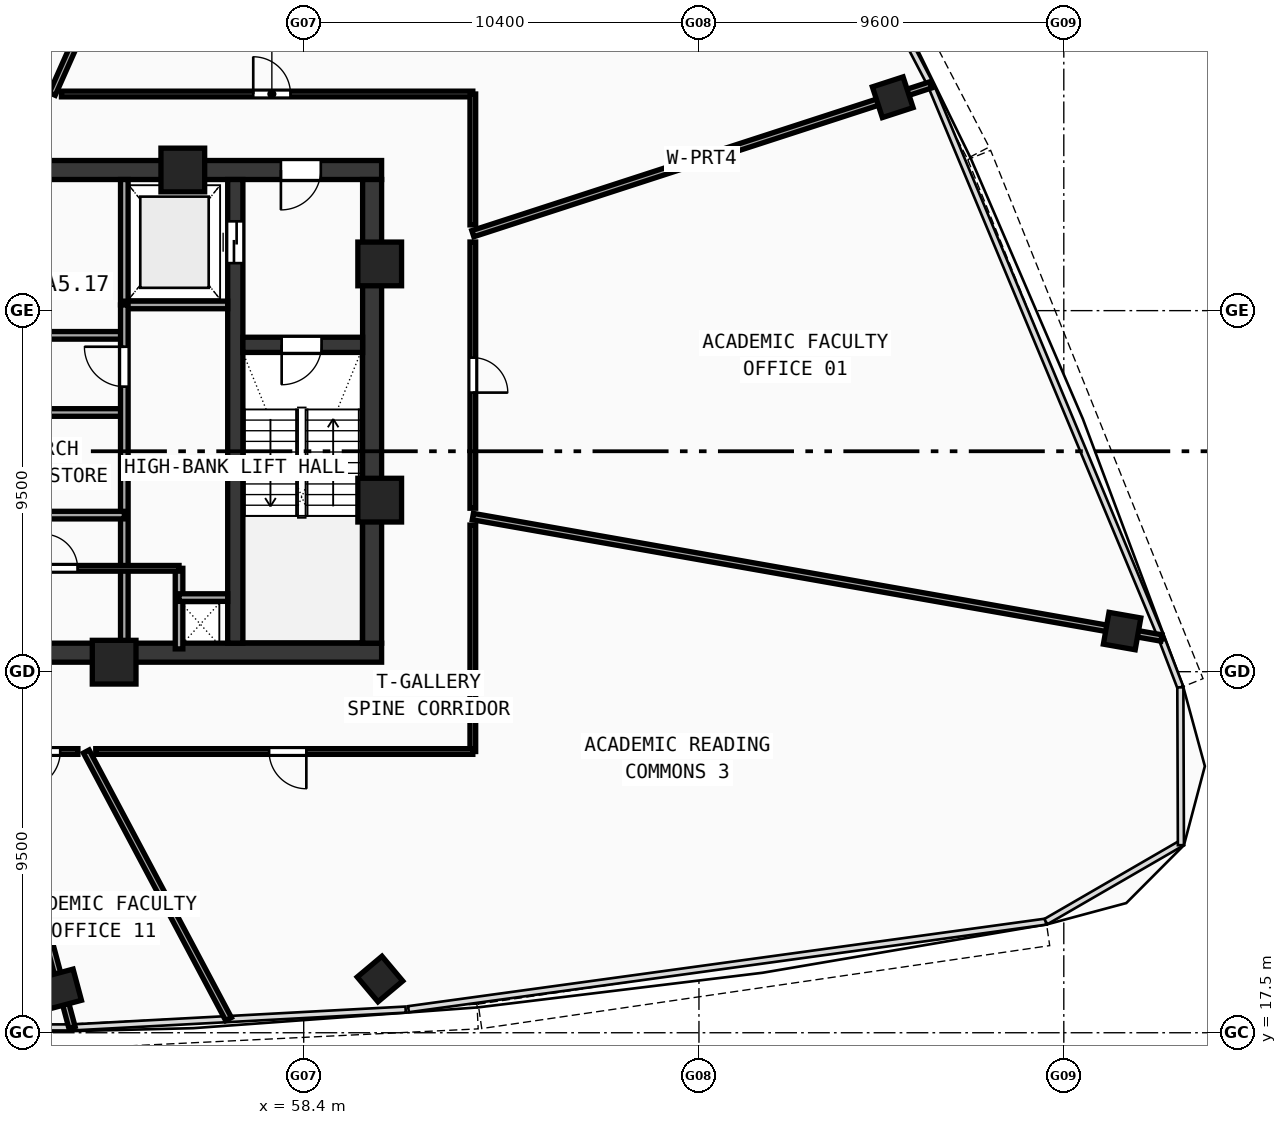
"""IFC4 building model, lengths in metres.
Left out: names, types, materials, properties, quantities, classifications, styles, units other than length and angle.
Written with IfcOpenShell. Run it as: python <this file> out.ifc"""

import sys

from ifc_helpers import new_model, si_unit, direction, frame, frame_2d, origin, origin_with_axes, origin_2d, place, context, subcontext, project, spatial, rectangle, hollow_rectangle, extrude, source, transform, mapped, element, fill, save


model = new_model("IFC4")
c1 = context("Model", 3, precision=1e-05, world=origin(), true_north=direction((0.0, 1.0)))
c2 = subcontext(c1, "Body", "Model", "MODEL_VIEW")
j1 = project(units=[si_unit("LENGTHUNIT", "METRE"), si_unit("PLANEANGLEUNIT", "RADIAN")], contexts=[c1])
p1 = place(None, origin())
s1 = spatial("IfcSite", under=j1, at=p1, CompositionType="ELEMENT")
p2 = place(p1, origin())
s2 = spatial("IfcBuilding", under=s1, at=p2, CompositionType="ELEMENT")
p3 = place(p2, frame((0.0, 0.0, 263.18)))
s3 = spatial("IfcBuildingStorey", under=s2, at=p3, CompositionType="ELEMENT", Elevation=263.18)
p4 = place(p3, frame((35.55, 27.5, 0.0), z_axis=(0.0, 0.0, 1.0), x_axis=(1.0, 0.0, 0.0)))
e1 = element("IfcWall", 1, at=p4, inside=s3, PredefinedType="SHEAR", context=c2, shape_type="SweptSolid", body=[
    extrude(rectangle(XDim=24.9, YDim=0.5, at=frame_2d((12.45, 0.0))), origin(), (0.0, 0.0, 1.0), 3.47),
])
p5 = place(p3, frame((49.2, 40.2, 0.0), z_axis=(0.0, 0.0, 1.0), x_axis=(1.0, 0.0, 0.0)))
e2 = element("IfcWall", 2, at=p5, inside=s3, PredefinedType="SHEAR", context=c2, shape_type="SweptSolid", body=[
    extrude(rectangle(XDim=11.25, YDim=0.5, at=frame_2d((5.625, 0.0))), origin(), (0.0, 0.0, 1.0), 3.47),
])
p6 = place(p5, frame((8.6, 0.0, 0.0)))
e3 = element("IfcOpeningElement", 3, at=p6, cuts=e2, PredefinedType="OPENING", context=c2, shape_type="SweptSolid", body=[
    extrude(rectangle(XDim=1.05, YDim=2.1, at=frame_2d((0.525, 1.05))), frame((0.0, 0.26, 0.0), z_axis=(0.0, -1.0, 0.0), x_axis=(1.0, 0.0, 0.0)), (0.0, 0.0, 1.0), 0.52),
])
p7 = place(p3, frame((60.2, 27.75, 0.0), z_axis=(0.0, 0.0, 1.0), x_axis=(0.0, 1.0, 0.0)))
e4 = element("IfcWall", 4, at=p7, inside=s3, PredefinedType="SHEAR", context=c2, shape_type="SweptSolid", body=[
    extrude(rectangle(XDim=12.2, YDim=0.5, at=frame_2d((6.1, 0.0))), origin(), (0.0, 0.0, 1.0), 3.47),
])
p8 = place(p3, frame((56.6, 27.75, 0.0), z_axis=(0.0, 0.0, 1.0), x_axis=(0.0, 1.0, 0.0)))
e5 = element("IfcWall", 5, at=p8, inside=s3, PredefinedType="SHEAR", context=c2, shape_type="SweptSolid", body=[
    extrude(rectangle(XDim=12.2, YDim=0.4, at=frame_2d((6.1, 0.0))), origin(), (0.0, 0.0, 1.0), 3.47),
])
p9 = place(p8, frame((10.0, 0.0, 0.0)))
e6 = element("IfcOpeningElement", 6, at=p9, cuts=e5, PredefinedType="OPENING", context=c2, shape_type="SweptSolid", body=[
    extrude(rectangle(XDim=1.1, YDim=2.1, at=frame_2d((0.55, 1.05))), frame((0.0, 0.21, 0.0), z_axis=(0.0, -1.0, 0.0), x_axis=(1.0, 0.0, 0.0)), (0.0, 0.0, 1.0), 0.42),
])
p10 = place(p3, frame((56.8, 35.6, 0.0), z_axis=(0.0, 0.0, 1.0), x_axis=(1.0, 0.0, 0.0)))
e7 = element("IfcWall", 7, at=p10, inside=s3, PredefinedType="SHEAR", context=c2, shape_type="SweptSolid", body=[
    extrude(rectangle(XDim=3.15, YDim=0.4, at=frame_2d((1.575, 0.0))), origin(), (0.0, 0.0, 1.0), 3.47),
])
p11 = place(p10, frame((1.02, 0.0, 0.0)))
e8 = element("IfcOpeningElement", 8, at=p11, cuts=e7, PredefinedType="OPENING", context=c2, shape_type="SweptSolid", body=[
    extrude(rectangle(XDim=1.05, YDim=2.1, at=frame_2d((0.525, 1.05))), frame((0.0, 0.21, 0.0), z_axis=(0.0, -1.0, 0.0), x_axis=(1.0, 0.0, 0.0)), (0.0, 0.0, 1.0), 0.42),
])
m1 = source(origin(), c2, "Body", "SweptSolid", [
    extrude(hollow_rectangle(XDim=1.15, YDim=1.15, WallThickness=0.048, at=origin_2d()), origin(), (0.0, 0.0, 1.0), 3.73),
])
for number, where, z_axis, x_axis in (
    (9, (53.412, 27.25, -0.26), (0.0, 0.0, 1.0), (1.0, 0.0, 0.0)),
    (10, (60.4, 31.513, -0.26), (0.0, 0.0, 1.0), (1.0, 0.0, 0.0)),
    (11, (60.4, 37.729, -0.26), (0.0, 0.0, 1.0), (1.0, 0.0, 0.0)),
    (12, (55.219, 40.2, -0.26), (0.0, 0.0, 1.0), (1.0, 0.0, 0.0)),
):
    element("IfcColumn", number, at=place(p3, frame(where, z_axis=z_axis, x_axis=x_axis)), inside=s3, PredefinedType="COLUMN", context=c2, shape_type="MappedRepresentation", body=[
        mapped(m1, transform((0.0, 0.0, 0.0), scale=1.0)),
    ])
m2 = source(origin(), c2, "Body", "SweptSolid", [
    extrude(hollow_rectangle(XDim=0.85, YDim=0.85, WallThickness=0.034, at=origin_2d()), origin(), (0.0, 0.0, 1.0), 3.73),
])
for number, where, z_axis, x_axis in (
    (13, (52.031, 18.654, -0.26), (0.0, 0.0, 1.0), (0.966, 0.259, 0.0)),
    (14, (60.407, 18.914, -0.26), (0.0, 0.0, 1.0), (0.766, 0.643, 0.0)),
    (15, (79.934, 28.069, -0.26), (0.0, 0.0, 1.0), (0.174, 0.985, 0.0)),
    (16, (73.899, 42.115, -0.26), (0.0, 0.0, 1.0), (-0.309, 0.951, 0.0)),
):
    element("IfcColumn", number, at=place(p3, frame(where, z_axis=z_axis, x_axis=x_axis)), inside=s3, PredefinedType="COLUMN", context=c2, shape_type="MappedRepresentation", body=[
        mapped(m2, transform((0.0, 0.0, 0.0), scale=1.0)),
    ])
p12 = place(p3, frame((53.68, 36.65, 0.0), z_axis=(0.0, 0.0, 1.0), x_axis=(0.0, 1.0, 0.0)))
e17 = element("IfcWall", 17, at=p12, inside=s3, PredefinedType="SOLIDWALL", context=c2, shape_type="SweptSolid", body=[
    extrude(rectangle(XDim=3.3, YDim=0.2, at=frame_2d((1.65, 0.0))), origin(), (0.0, 0.0, 1.0), 3.47),
])
p13 = place(p3, frame((53.68, 36.65, 0.0), z_axis=(0.0, 0.0, 1.0), x_axis=(1.0, 0.0, 0.0)))
e18 = element("IfcWall", 18, at=p13, inside=s3, PredefinedType="SOLIDWALL", context=c2, shape_type="SweptSolid", body=[
    extrude(rectangle(XDim=2.72, YDim=0.2, at=frame_2d((1.36, 0.0))), origin(), (0.0, 0.0, 1.0), 3.47),
])
p14 = place(p3, frame((48.95, 35.85, 0.0), z_axis=(0.0, 0.0, 1.0), x_axis=(1.0, 0.0, 0.0)))
e19 = element("IfcWall", 19, at=p14, inside=s3, PredefinedType="SOLIDWALL", context=c2, shape_type="SweptSolid", body=[
    extrude(rectangle(XDim=4.73, YDim=0.2, at=frame_2d((2.365, 0.0))), origin(), (0.0, 0.0, 1.0), 3.47),
])
p15 = place(p14, frame((1.8, 0.0, 0.0)))
e20 = element("IfcOpeningElement", 20, at=p15, cuts=e19, PredefinedType="OPENING", context=c2, shape_type="SweptSolid", body=[
    extrude(rectangle(XDim=0.9, YDim=2.1, at=frame_2d((0.45, 1.05))), frame((0.0, 0.11, 0.0), z_axis=(0.0, -1.0, 0.0), x_axis=(1.0, 0.0, 0.0)), (0.0, 0.0, 1.0), 0.22),
])
p16 = place(p3, frame((43.85, 33.82, 0.0), z_axis=(0.0, 0.0, 1.0), x_axis=(1.0, 0.0, 0.0)))
e21 = element("IfcWall", 21, at=p16, inside=s3, PredefinedType="SOLIDWALL", context=c2, shape_type="SweptSolid", body=[
    extrude(rectangle(XDim=9.83, YDim=0.2, at=frame_2d((4.915, 0.0))), origin(), (0.0, 0.0, 1.0), 3.47),
])
p17 = place(p16, frame((1.2, 0.0, 0.0)))
e22 = element("IfcOpeningElement", 22, at=p17, cuts=e21, PredefinedType="OPENING", context=c2, shape_type="SweptSolid", body=[
    extrude(rectangle(XDim=0.9, YDim=2.1, at=frame_2d((0.45, 1.05))), frame((0.0, 0.11, 0.0), z_axis=(0.0, -1.0, 0.0), x_axis=(1.0, 0.0, 0.0)), (0.0, 0.0, 1.0), 0.22),
])
p18 = place(p16, frame((4.6, 0.0, 0.0)))
e23 = element("IfcOpeningElement", 23, at=p18, cuts=e21, PredefinedType="OPENING", context=c2, shape_type="SweptSolid", body=[
    extrude(rectangle(XDim=0.9, YDim=2.1, at=frame_2d((0.45, 1.05))), frame((0.0, 0.11, 0.0), z_axis=(0.0, -1.0, 0.0), x_axis=(1.0, 0.0, 0.0)), (0.0, 0.0, 1.0), 0.22),
])
p19 = place(p3, frame((53.68, 27.6, 0.0), z_axis=(0.0, 0.0, 1.0), x_axis=(0.0, 1.0, 0.0)))
e24 = element("IfcWall", 24, at=p19, inside=s3, PredefinedType="SOLIDWALL", context=c2, shape_type="SweptSolid", body=[
    extrude(rectangle(XDim=9.05, YDim=0.2, at=frame_2d((4.525, 0.0))), origin(), (0.0, 0.0, 1.0), 3.47),
])
p20 = place(p19, frame((6.9, 0.0, 0.0)))
e25 = element("IfcOpeningElement", 25, at=p20, cuts=e24, PredefinedType="OPENING", context=c2, shape_type="SweptSolid", body=[
    extrude(rectangle(XDim=1.05, YDim=2.1, at=frame_2d((0.525, 1.05))), frame((0.0, 0.11, 0.0), z_axis=(0.0, -1.0, 0.0), x_axis=(1.0, 0.0, 0.0)), (0.0, 0.0, 1.0), 0.22),
])
p21 = place(p3, frame((43.85, 31.12, 0.0), z_axis=(0.0, 0.0, 1.0), x_axis=(1.0, 0.0, 0.0)))
e26 = element("IfcWall", 26, at=p21, inside=s3, PredefinedType="SOLIDWALL", context=c2, shape_type="SweptSolid", body=[
    extrude(rectangle(XDim=9.83, YDim=0.2, at=frame_2d((4.915, 0.0))), origin(), (0.0, 0.0, 1.0), 3.47),
])
p22 = place(p3, frame((55.12, 27.6, 0.0), z_axis=(0.0, 0.0, 1.0), x_axis=(0.0, 1.0, 0.0)))
e27 = element("IfcWall", 27, at=p22, inside=s3, PredefinedType="SOLIDWALL", context=c2, shape_type="SweptSolid", body=[
    extrude(rectangle(XDim=2.12, YDim=0.2, at=frame_2d((1.06, 0.0))), origin(), (0.0, 0.0, 1.0), 3.47),
])
p23 = place(p3, frame((55.12, 28.95, 0.0), z_axis=(0.0, 0.0, 1.0), x_axis=(1.0, 0.0, 0.0)))
e28 = element("IfcWall", 28, at=p23, inside=s3, PredefinedType="SOLIDWALL", context=c2, shape_type="SweptSolid", body=[
    extrude(rectangle(XDim=1.28, YDim=0.2, at=frame_2d((0.64, 0.0))), origin(), (0.0, 0.0, 1.0), 3.47),
])
p24 = place(p3, frame((51.05, 29.72, 0.0), z_axis=(0.0, 0.0, 1.0), x_axis=(1.0, 0.0, 0.0)))
e29 = element("IfcWall", 29, at=p24, inside=s3, PredefinedType="PARTITIONING", context=c2, shape_type="SweptSolid", body=[
    extrude(rectangle(XDim=4.07, YDim=0.15, at=frame_2d((2.035, 0.0))), origin(), (0.0, 0.0, 1.0), 3.47),
])
p25 = place(p24, frame((0.5, 0.0, 0.0)))
e30 = element("IfcOpeningElement", 30, at=p25, cuts=e29, PredefinedType="OPENING", context=c2, shape_type="SweptSolid", body=[
    extrude(rectangle(XDim=0.9, YDim=2.1, at=frame_2d((0.45, 1.05))), frame((0.0, 0.085, 0.0), z_axis=(0.0, -1.0, 0.0), x_axis=(1.0, 0.0, 0.0)), (0.0, 0.0, 1.0), 0.17),
])
p26 = place(p3, frame((62.85, 38.525, 0.0), z_axis=(0.0, 0.0, 1.0), x_axis=(0.951057436246, 0.309014163043, 0.0)))
e31 = element("IfcWall", 31, at=p26, inside=s3, PredefinedType="PARTITIONING", context=c2, shape_type="SweptSolid", body=[
    extrude(rectangle(XDim=12.667, YDim=0.17, at=frame_2d((6.333, 0.0))), origin(), (0.0, 0.0, 1.0), 2.82),
])
p27 = place(p3, frame((51.784, 42.2, 0.0), z_axis=(0.0, 0.0, 1.0), x_axis=(0.406737985753, 0.913544859843, 0.0)))
e32 = element("IfcWall", 32, at=p27, inside=s3, PredefinedType="PARTITIONING", context=c2, shape_type="SweptSolid", body=[
    extrude(rectangle(XDim=24.707, YDim=0.17, at=frame_2d((12.354, 0.0))), origin(), (0.0, 0.0, 1.0), 2.82),
])
p28 = place(p3, frame((50.358, 24.9, 0.0), z_axis=(0.0, 0.0, 1.0), x_axis=(0.258810769147, -0.965928043787, 0.0)))
e33 = element("IfcWall", 33, at=p28, inside=s3, PredefinedType="PARTITIONING", context=c2, shape_type="SweptSolid", body=[
    extrude(rectangle(XDim=7.516, YDim=0.17, at=frame_2d((3.758, 0.0))), origin(), (0.0, 0.0, 1.0), 2.82),
])
p29 = place(p3, frame((52.679, 24.9, 0.0), z_axis=(0.0, 0.0, 1.0), x_axis=(0.469475347358, -0.882945580556, 0.0)))
e34 = element("IfcWall", 34, at=p29, inside=s3, PredefinedType="PARTITIONING", context=c2, shape_type="SweptSolid", body=[
    extrude(rectangle(XDim=7.973, YDim=0.17, at=frame_2d((3.987, 0.0))), origin(), (0.0, 0.0, 1.0), 2.82),
])
p30 = place(p3, frame((62.85, 31.082, 0.0), z_axis=(0.0, 0.0, 1.0), x_axis=(0.984806394916, -0.173655879639, 0.0)))
e35 = element("IfcWall", 35, at=p30, inside=s3, PredefinedType="PARTITIONING", context=c2, shape_type="SweptSolid", body=[
    extrude(rectangle(XDim=18.397, YDim=0.17, at=frame_2d((9.199, 0.0))), origin(), (0.0, 0.0, 1.0), 2.82),
])
p31 = place(p3, frame((52.025, 42.2, 0.0), z_axis=(0.0, 0.0, 1.0), x_axis=(1.0, 0.0, 0.0)))
e36 = element("IfcWall", 36, at=p31, inside=s3, PredefinedType="PARTITIONING", context=c2, shape_type="SweptSolid", body=[
    extrude(rectangle(XDim=10.825, YDim=0.15, at=frame_2d((5.413, 0.0))), origin(), (0.0, 0.0, 1.0), 2.82),
])
p32 = place(p31, frame((5.047, 0.0, 0.0)))
e37 = element("IfcOpeningElement", 37, at=p32, cuts=e36, PredefinedType="OPENING", context=c2, shape_type="SweptSolid", body=[
    extrude(rectangle(XDim=0.98, YDim=2.12, at=frame_2d((0.49, 1.06))), frame((0.0, 0.085, 0.0), z_axis=(0.0, -1.0, 0.0), x_axis=(1.0, 0.0, 0.0)), (0.0, 0.0, 1.0), 0.17),
])
p33 = place(p3, frame((62.85, 42.2, 0.0), z_axis=(0.0, 0.0, 1.0), x_axis=(0.0, -1.0, 0.0)))
e38 = element("IfcWall", 38, at=p33, inside=s3, PredefinedType="PARTITIONING", context=c2, shape_type="SweptSolid", body=[
    extrude(rectangle(XDim=3.444, YDim=0.15, at=frame_2d((1.722, 0.0))), origin(), (0.0, 0.0, 1.0), 3.12),
])
p34 = place(p3, frame((62.85, 38.305, 0.0), z_axis=(0.0, 0.0, 1.0), x_axis=(0.0, -1.0, 0.0)))
e39 = element("IfcWall", 39, at=p34, inside=s3, PredefinedType="PARTITIONING", context=c2, shape_type="SweptSolid", body=[
    extrude(rectangle(XDim=7.004, YDim=0.15, at=frame_2d((3.502, 0.0))), origin(), (0.0, 0.0, 1.0), 3.47),
])
p35 = place(p34, frame((3.042, 0.0, 0.0)))
e40 = element("IfcOpeningElement", 40, at=p35, cuts=e39, PredefinedType="OPENING", context=c2, shape_type="SweptSolid", body=[
    extrude(rectangle(XDim=0.92, YDim=2.1, at=frame_2d((0.46, 1.05))), frame((0.0, 0.085, 0.0), z_axis=(0.0, -1.0, 0.0), x_axis=(1.0, 0.0, 0.0)), (0.0, 0.0, 1.0), 0.17),
])
p36 = place(p3, frame((62.85, 30.858, 0.0), z_axis=(0.0, 0.0, 1.0), x_axis=(0.0, -1.0, 0.0)))
e41 = element("IfcWall", 41, at=p36, inside=s3, PredefinedType="PARTITIONING", context=c2, shape_type="SweptSolid", body=[
    extrude(rectangle(XDim=5.958, YDim=0.15, at=frame_2d((2.979, 0.0))), origin(), (0.0, 0.0, 1.0), 3.12),
])
p37 = place(p3, frame((62.85, 24.9, 0.0), z_axis=(0.0, 0.0, 1.0), x_axis=(-1.0, 0.0, 0.0)))
e42 = element("IfcWall", 42, at=p37, inside=s3, PredefinedType="PARTITIONING", context=c2, shape_type="SweptSolid", body=[
    extrude(rectangle(XDim=9.922, YDim=0.15, at=frame_2d((4.961, 0.0))), origin(), (0.0, 0.0, 1.0), 2.82),
])
p38 = place(p37, frame((4.381, 0.0, 0.0)))
e43 = element("IfcOpeningElement", 43, at=p38, cuts=e42, PredefinedType="OPENING", context=c2, shape_type="SweptSolid", body=[
    extrude(rectangle(XDim=0.98, YDim=2.12, at=frame_2d((0.49, 1.06))), frame((0.0, 0.085, 0.0), z_axis=(0.0, -1.0, 0.0), x_axis=(1.0, 0.0, 0.0)), (0.0, 0.0, 1.0), 0.17),
])
p39 = place(p3, frame((52.459, 24.9, 0.0), z_axis=(0.0, 0.0, 1.0), x_axis=(-1.0, 0.0, 0.0)))
e44 = element("IfcWall", 44, at=p39, inside=s3, PredefinedType="PARTITIONING", context=c2, shape_type="SweptSolid", body=[
    extrude(rectangle(XDim=1.873, YDim=0.15, at=frame_2d((0.937, 0.0))), origin(), (0.0, 0.0, 1.0), 3.47),
])
p40 = place(p39, frame((0.466, 0.0, 0.0)))
e45 = element("IfcOpeningElement", 45, at=p40, cuts=e44, PredefinedType="OPENING", context=c2, shape_type="SweptSolid", body=[
    extrude(rectangle(XDim=0.98, YDim=2.12, at=frame_2d((0.49, 1.06))), frame((0.0, 0.085, 0.0), z_axis=(0.0, -1.0, 0.0), x_axis=(1.0, 0.0, 0.0)), (0.0, 0.0, 1.0), 0.17),
])
m3 = source(origin(), c2, "Body", "SweptSolid", [
    extrude(rectangle(XDim=1.05, YDim=2.1, at=frame_2d((0.525, 1.05))), frame((0.0, 0.025, 0.0), z_axis=(0.0, -1.0, 0.0), x_axis=(1.0, 0.0, 0.0)), (0.0, 0.0, 1.0), 0.05),
])
p41 = place(p11, frame((1.05, 0.0, 0.0), z_axis=(0.0, 0.0, 1.0), x_axis=(-1.0, 0.0, 0.0)))
e46 = element("IfcDoor", 46, at=p41, inside=s3, OperationType="SINGLE_SWING_RIGHT", PredefinedType="DOOR", context=c2, shape_type="MappedRepresentation", body=[
    mapped(m3, transform((0.0, 0.0, 0.0), scale=1.0)),
])
fill(e8, e46)
p42 = place(p6, frame((1.05, 0.0, 0.0), z_axis=(0.0, 0.0, 1.0), x_axis=(-1.0, 0.0, 0.0)))
e47 = element("IfcDoor", 47, at=p42, inside=s3, OperationType="SINGLE_SWING_RIGHT", PredefinedType="DOOR", context=c2, shape_type="MappedRepresentation", body=[
    mapped(m3, transform((0.0, 0.0, 0.0), scale=1.0)),
])
fill(e3, e47)
m4 = source(origin(), c2, "Body", "SweptSolid", [
    extrude(rectangle(XDim=1.1, YDim=2.1, at=frame_2d((0.55, 1.05))), frame((0.0, 0.025, 0.0), z_axis=(0.0, -1.0, 0.0), x_axis=(1.0, 0.0, 0.0)), (0.0, 0.0, 1.0), 0.05),
])
p43 = place(p9, origin_with_axes())
e48 = element("IfcDoor", 48, at=p43, inside=s3, OperationType="DOUBLE_DOOR_SLIDING", PredefinedType="DOOR", context=c2, shape_type="MappedRepresentation", body=[
    mapped(m4, transform((0.0, 0.0, 0.0), scale=1.0)),
])
fill(e6, e48)
p44 = place(p20, origin_with_axes())
e49 = element("IfcDoor", 49, at=p44, inside=s3, OperationType="SINGLE_SWING_RIGHT", PredefinedType="DOOR", context=c2, shape_type="MappedRepresentation", body=[
    mapped(m3, transform((0.0, 0.0, 0.0), scale=1.0)),
])
fill(e25, e49)
m5 = source(origin(), c2, "Body", "SweptSolid", [
    extrude(rectangle(XDim=0.9, YDim=2.1, at=frame_2d((0.45, 1.05))), frame((0.0, 0.025, 0.0), z_axis=(0.0, -1.0, 0.0), x_axis=(1.0, 0.0, 0.0)), (0.0, 0.0, 1.0), 0.05),
])
p45 = place(p25, origin_with_axes())
e50 = element("IfcDoor", 50, at=p45, inside=s3, OperationType="SINGLE_SWING_LEFT", PredefinedType="DOOR", context=c2, shape_type="MappedRepresentation", body=[
    mapped(m5, transform((0.0, 0.0, 0.0), scale=1.0)),
])
fill(e30, e50)
m6 = source(origin(), c2, "Body", "SweptSolid", [
    extrude(rectangle(XDim=0.92, YDim=2.1, at=frame_2d((0.46, 1.05))), frame((0.0, 0.025, 0.0), z_axis=(0.0, -1.0, 0.0), x_axis=(1.0, 0.0, 0.0)), (0.0, 0.0, 1.0), 0.05),
])
p46 = place(p35, origin_with_axes())
e51 = element("IfcDoor", 51, at=p46, inside=s3, OperationType="SINGLE_SWING_RIGHT", PredefinedType="DOOR", context=c2, shape_type="MappedRepresentation", body=[
    mapped(m6, transform((0.0, 0.0, 0.0), scale=1.0)),
])
fill(e40, e51)
m7 = source(origin(), c2, "Body", "SweptSolid", [
    extrude(rectangle(XDim=0.98, YDim=2.12, at=frame_2d((0.49, 1.06))), frame((0.0, 0.025, 0.0), z_axis=(0.0, -1.0, 0.0), x_axis=(1.0, 0.0, 0.0)), (0.0, 0.0, 1.0), 0.05),
])
p47 = place(p32, origin_with_axes())
e52 = element("IfcDoor", 52, at=p47, inside=s3, OperationType="SINGLE_SWING_LEFT", PredefinedType="DOOR", context=c2, shape_type="MappedRepresentation", body=[
    mapped(m7, transform((0.0, 0.0, 0.0), scale=1.0)),
])
fill(e37, e52)
p48 = place(p40, origin_with_axes())
e53 = element("IfcDoor", 53, at=p48, inside=s3, OperationType="SINGLE_SWING_RIGHT", PredefinedType="DOOR", context=c2, shape_type="MappedRepresentation", body=[
    mapped(m7, transform((0.0, 0.0, 0.0), scale=1.0)),
])
fill(e45, e53)
p49 = place(p38, origin_with_axes())
e54 = element("IfcDoor", 54, at=p49, inside=s3, OperationType="SINGLE_SWING_LEFT", PredefinedType="DOOR", context=c2, shape_type="MappedRepresentation", body=[
    mapped(m7, transform((0.0, 0.0, 0.0), scale=1.0)),
])
fill(e43, e54)
save(model, sys.argv[1])
